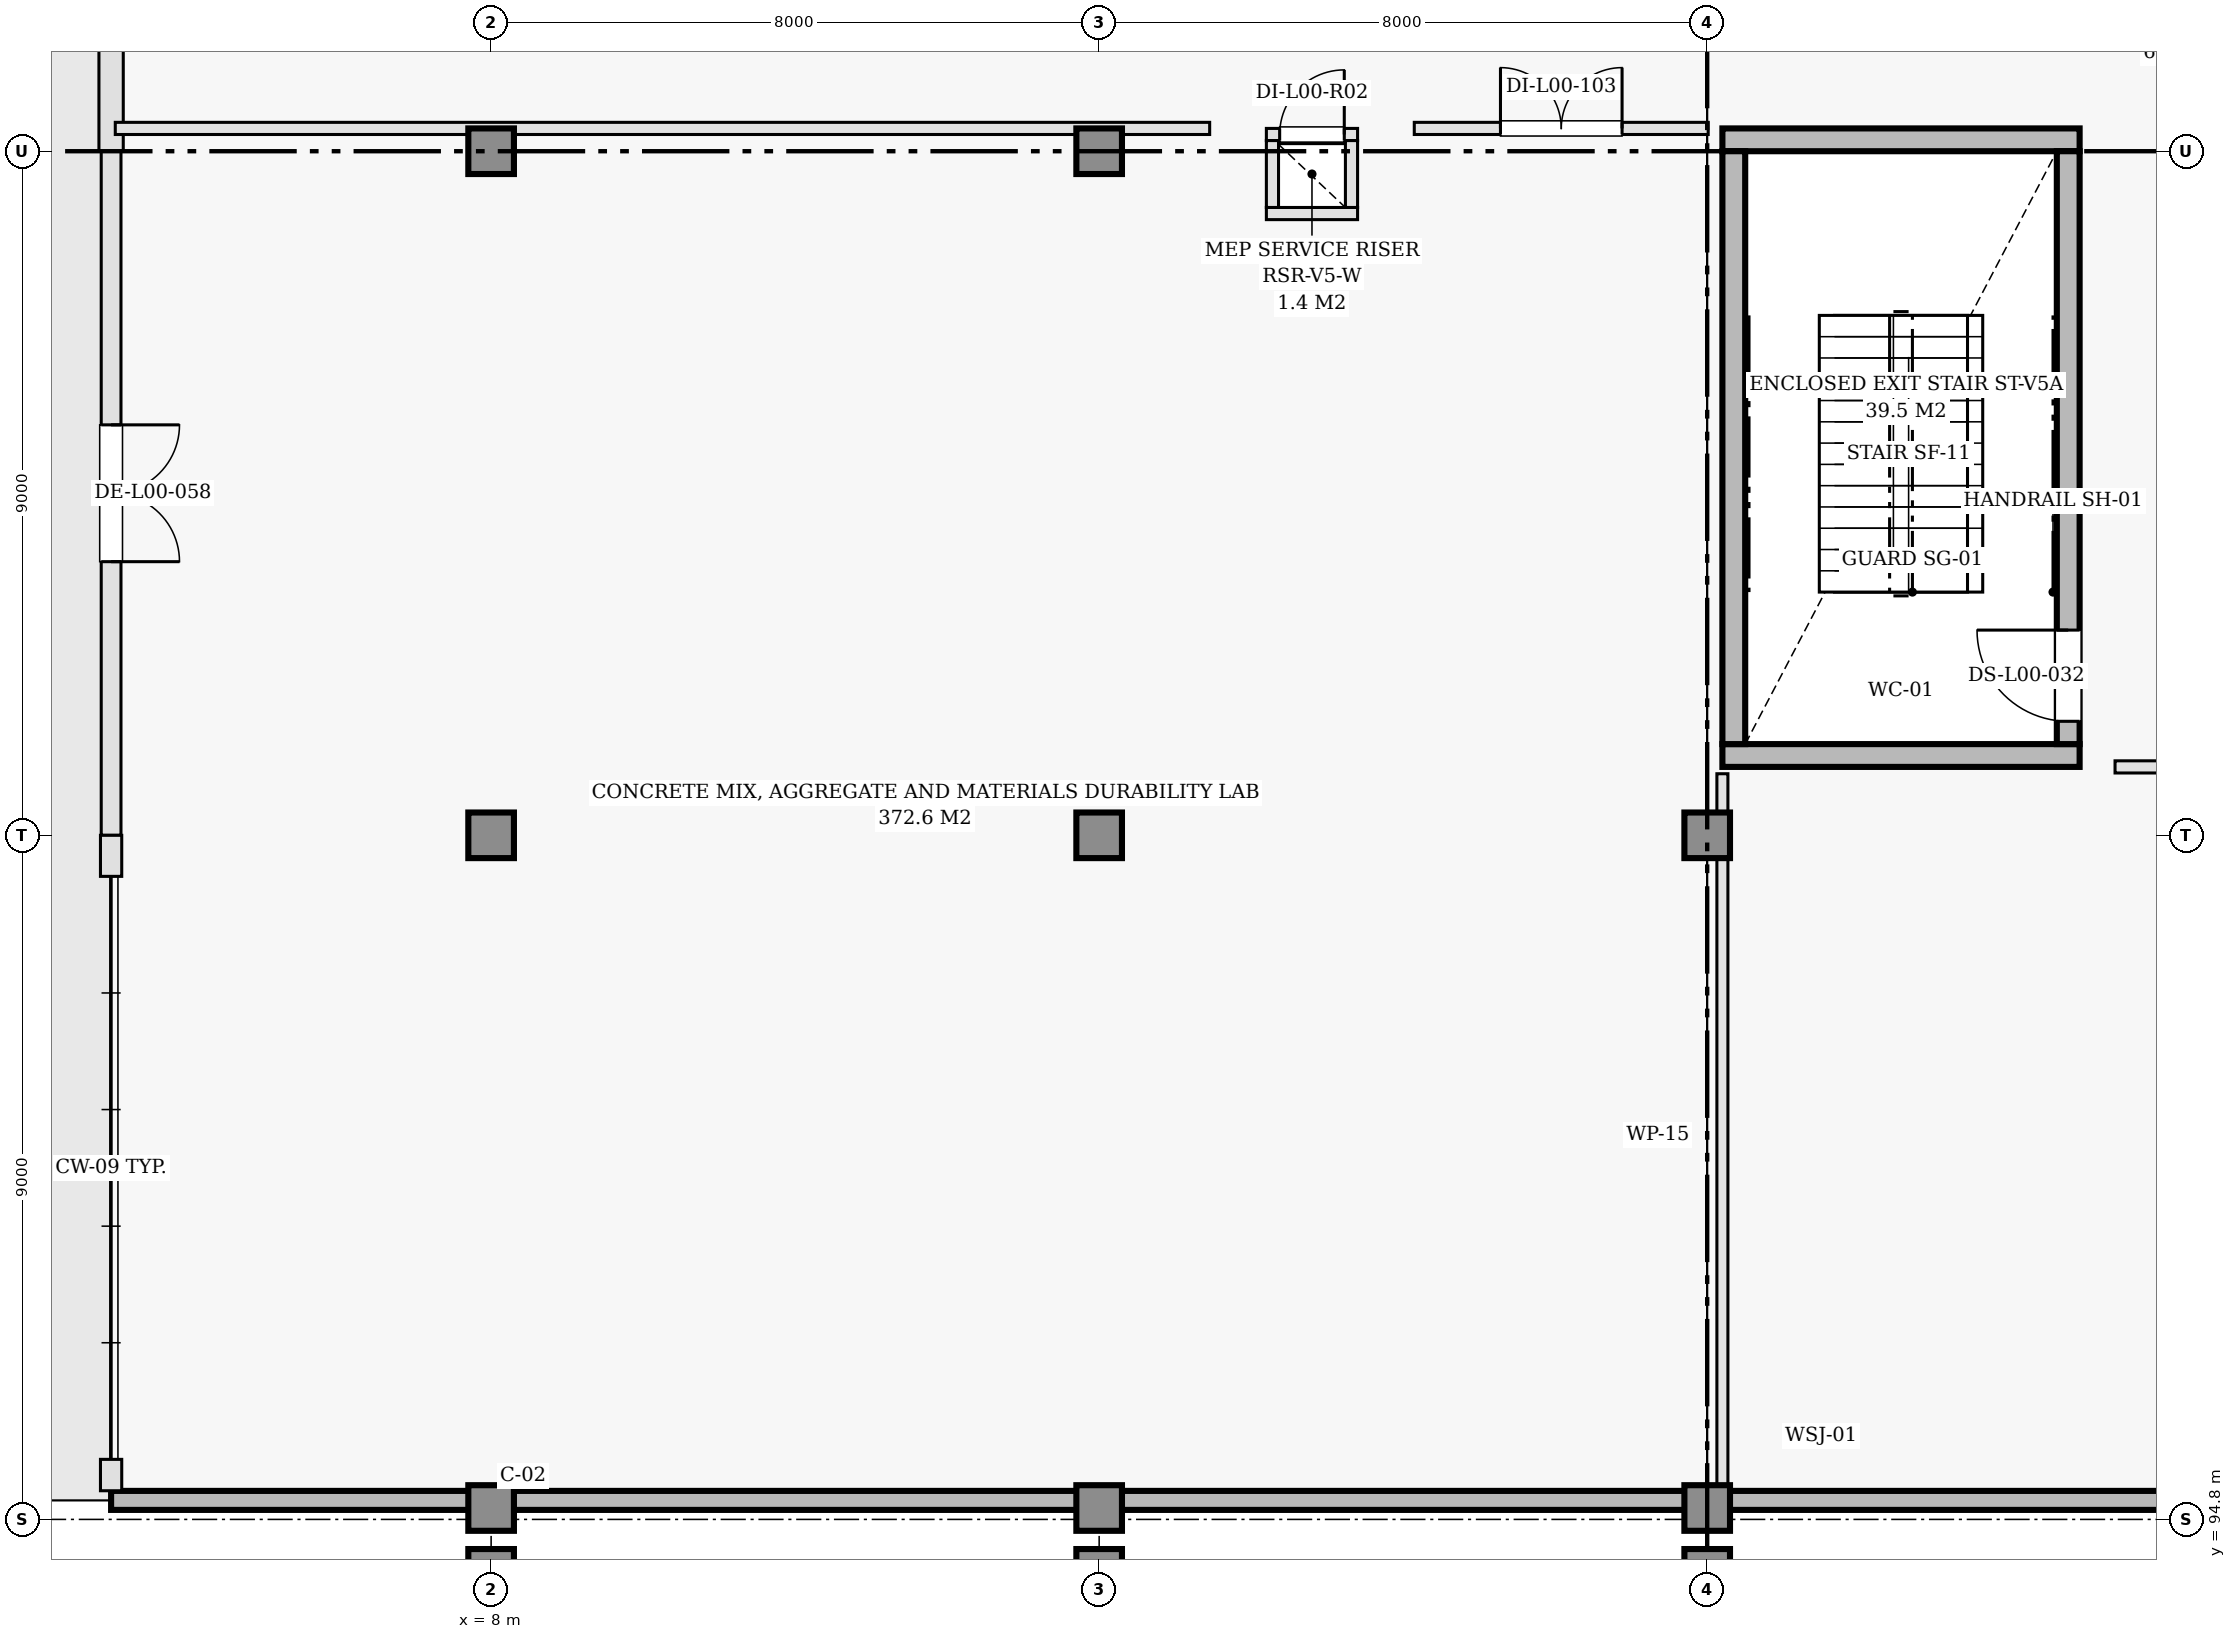
"""IFC4 building model, lengths in metres.
Left out: names, types, materials, properties, quantities, classifications, styles, units other than length and angle.
Written with IfcOpenShell. Run it as: python <this file> out.ifc"""

import sys

from ifc_helpers import new_model, si_unit, direction, frame, frame_2d, origin, origin_2d, place, context, subcontext, project, spatial, rectangle, extrude, element, fill, save


model = new_model("IFC4")
c1 = context("Model", 3, precision=1e-05, world=origin(), true_north=direction((0.0, 1.0)))
c2 = subcontext(c1, "Body", "Model", "MODEL_VIEW")
j1 = project(units=[si_unit("LENGTHUNIT", "METRE"), si_unit("PLANEANGLEUNIT", "RADIAN")], contexts=[c1])
p1 = place(None, origin())
s1 = spatial("IfcSite", under=j1, at=p1, CompositionType="ELEMENT")
p2 = place(p1, origin())
s2 = spatial("IfcBuilding", under=s1, at=p2, CompositionType="ELEMENT")
p3 = place(p2, origin())
s3 = spatial("IfcBuildingStorey", under=s2, at=p3, CompositionType="ELEMENT", Elevation=0.0)
for number, where, z_axis, x_axis in (
    (1, (8.0, 94.95, 0.0), (0.0, 0.0, 1.0), (1.0, 0.0, 0.0)),
    (2, (8.0, 103.8, 0.0), (0.0, 0.0, 1.0), (1.0, 0.0, 0.0)),
    (3, (8.0, 112.8, 0.0), (0.0, 0.0, 1.0), (1.0, 0.0, 0.0)),
    (4, (16.0, 94.95, 0.0), (0.0, 0.0, 1.0), (1.0, 0.0, 0.0)),
    (5, (16.0, 103.8, 0.0), (0.0, 0.0, 1.0), (1.0, 0.0, 0.0)),
    (6, (16.0, 112.8, 0.0), (0.0, 0.0, 1.0), (1.0, 0.0, 0.0)),
    (7, (24.0, 94.95, 0.0), (0.0, 0.0, 1.0), (1.0, 0.0, 0.0)),
    (8, (24.0, 103.8, 0.0), (0.0, 0.0, 1.0), (1.0, 0.0, 0.0)),
):
    element("IfcColumn", number, at=place(p3, frame(where, z_axis=z_axis, x_axis=x_axis)), inside=s3, PredefinedType="COLUMN", context=c2, shape_type="SweptSolid", body=[
        extrude(rectangle(XDim=0.6, YDim=0.6, at=origin_2d()), origin(), (0.0, 0.0, 1.0), 4.8),
    ])
for number, where, z_axis, x_axis in (
    (9, (8.0, 94.2, 0.0), (0.0, 0.0, 1.0), (1.0, 0.0, 0.0)),
    (10, (16.0, 94.2, 0.0), (0.0, 0.0, 1.0), (1.0, 0.0, 0.0)),
    (11, (24.0, 94.2, 0.0), (0.0, 0.0, 1.0), (1.0, 0.0, 0.0)),
):
    element("IfcColumn", number, at=place(p3, frame(where, z_axis=z_axis, x_axis=x_axis)), inside=s3, PredefinedType="COLUMN", context=c2, shape_type="SweptSolid", body=[
        extrude(rectangle(XDim=0.42, YDim=0.42, at=origin_2d()), origin(), (0.0, 0.0, 1.0), 4.8),
    ])
p4 = place(p3, frame((3.0, 95.05, 0.0), z_axis=(0.0, 0.0, 1.0), x_axis=(1.0, 0.0, 0.0)))
e12 = element("IfcWall", 12, at=p4, inside=s3, PredefinedType="SHEAR", context=c2, shape_type="SweptSolid", body=[
    extrude(rectangle(XDim=45.0, YDim=0.25, at=frame_2d((22.5, 0.0))), origin(), (0.0, 0.0, 1.0), 4.52),
])
p5 = place(p3, frame((3.0, 121.8, 0.0), z_axis=(0.0, 0.0, 1.0), x_axis=(0.0, -1.0, 0.0)))
e13 = element("IfcWall", 13, at=p5, inside=s3, PredefinedType="SOLIDWALL", context=c2, shape_type="SweptSolid", body=[
    extrude(rectangle(XDim=9.0, YDim=0.32, at=frame_2d((4.5, 0.0))), origin(), (0.0, 0.0, 1.0), 3.755),
])
p6 = place(p5, frame((2.1, 0.0, 0.95)))
e14 = element("IfcOpeningElement", 14, at=p6, cuts=e13, PredefinedType="OPENING", context=c2, shape_type="SweptSolid", body=[
    extrude(rectangle(XDim=1.8, YDim=1.75, at=frame_2d((0.9, 0.875))), frame((0.0, 0.17, 0.0), z_axis=(0.0, -1.0, 0.0), x_axis=(1.0, 0.0, 0.0)), (0.0, 0.0, 1.0), 0.34),
])
p7 = place(p3, frame((3.0, 112.8, 0.0), z_axis=(0.0, 0.0, 1.0), x_axis=(0.0, -1.0, 0.0)))
e15 = element("IfcWall", 15, at=p7, inside=s3, PredefinedType="SOLIDWALL", context=c2, shape_type="SweptSolid", body=[
    extrude(rectangle(XDim=9.0, YDim=0.26, at=frame_2d((4.5, 0.0))), origin(), (0.0, 0.0, 1.0), 3.755),
])
p8 = place(p7, frame((3.6, 0.0, 0.0)))
e16 = element("IfcOpeningElement", 16, at=p8, cuts=e15, PredefinedType="OPENING", context=c2, shape_type="SweptSolid", body=[
    extrude(rectangle(XDim=1.8, YDim=2.2, at=frame_2d((0.9, 1.1))), frame((0.0, 0.14, 0.0), z_axis=(0.0, -1.0, 0.0), x_axis=(1.0, 0.0, 0.0)), (0.0, 0.0, 1.0), 0.28),
])
p9 = place(p3, frame((3.0, 103.8, 0.0), z_axis=(0.0, 0.0, 1.0), x_axis=(0.0, -1.0, 0.0)))
e17 = element("IfcWall", 17, at=p9, inside=s3, PredefinedType="SOLIDWALL", context=c2, shape_type="SweptSolid", body=[
    extrude(rectangle(XDim=0.54, YDim=0.28, at=frame_2d((0.27, 0.0))), origin(), (0.0, 0.0, 1.0), 3.755),
])
p10 = place(p3, frame((3.0, 95.59, 0.0), z_axis=(0.0, 0.0, 1.0), x_axis=(0.0, -1.0, 0.0)))
e18 = element("IfcWall", 18, at=p10, inside=s3, PredefinedType="SOLIDWALL", context=c2, shape_type="SweptSolid", body=[
    extrude(rectangle(XDim=0.413, YDim=0.28, at=frame_2d((0.207, 0.0))), origin(), (0.0, 0.0, 1.0), 3.755),
])
for number, where, z_axis, x_axis in (
    (19, (24.2, 104.85, 0.0), (0.0, 0.0, 1.0), (1.0, 0.0, 0.0)),
    (20, (24.2, 112.95, 0.0), (0.0, 0.0, 1.0), (1.0, 0.0, 0.0)),
):
    element("IfcWall", number, at=place(p3, frame(where, z_axis=z_axis, x_axis=x_axis)), inside=s3, PredefinedType="SHEAR", context=c2, shape_type="SweptSolid", body=[
        extrude(rectangle(XDim=4.7, YDim=0.3, at=frame_2d((2.35, 0.0))), origin(), (0.0, 0.0, 1.0), 4.52),
    ])
p11 = place(p3, frame((24.35, 105.0, 0.0), z_axis=(0.0, 0.0, 1.0), x_axis=(0.0, 1.0, 0.0)))
e21 = element("IfcWall", 21, at=p11, inside=s3, PredefinedType="SHEAR", context=c2, shape_type="SweptSolid", body=[
    extrude(rectangle(XDim=7.8, YDim=0.3, at=frame_2d((3.9, 0.0))), origin(), (0.0, 0.0, 1.0), 4.52),
])
p12 = place(p3, frame((28.75, 105.0, 0.0), z_axis=(0.0, 0.0, 1.0), x_axis=(0.0, 1.0, 0.0)))
e22 = element("IfcWall", 22, at=p12, inside=s3, PredefinedType="SHEAR", context=c2, shape_type="SweptSolid", body=[
    extrude(rectangle(XDim=7.8, YDim=0.3, at=frame_2d((3.9, 0.0))), origin(), (0.0, 0.0, 1.0), 4.52),
])
p13 = place(p12, frame((0.3, 0.0, 0.0)))
e23 = element("IfcOpeningElement", 23, at=p13, cuts=e22, PredefinedType="OPENING", context=c2, shape_type="SweptSolid", body=[
    extrude(rectangle(XDim=1.2, YDim=2.15, at=frame_2d((0.6, 1.075))), frame((0.0, 0.16, 0.0), z_axis=(0.0, -1.0, 0.0), x_axis=(1.0, 0.0, 0.0)), (0.0, 0.0, 1.0), 0.32),
])
p14 = place(p3, frame((18.2, 111.98, 0.0), z_axis=(0.0, 0.0, 1.0), x_axis=(1.0, 0.0, 0.0)))
e24 = element("IfcWall", 24, at=p14, inside=s3, PredefinedType="PARTITIONING", context=c2, shape_type="SweptSolid", body=[
    extrude(rectangle(XDim=1.2, YDim=0.16, at=frame_2d((0.6, 0.0))), origin(), (0.0, 0.0, 1.0), 4.52),
])
p15 = place(p3, frame((18.2, 113.02, 0.0), z_axis=(0.0, 0.0, 1.0), x_axis=(1.0, 0.0, 0.0)))
e25 = element("IfcWall", 25, at=p15, inside=s3, PredefinedType="PARTITIONING", context=c2, shape_type="SweptSolid", body=[
    extrude(rectangle(XDim=1.2, YDim=0.16, at=frame_2d((0.6, 0.0))), origin(), (0.0, 0.0, 1.0), 4.52),
])
p16 = place(p15, frame((0.175, 0.0, 0.0)))
e26 = element("IfcOpeningElement", 26, at=p16, cuts=e25, PredefinedType="OPENING", context=c2, shape_type="SweptSolid", body=[
    extrude(rectangle(XDim=0.85, YDim=2.02, at=frame_2d((0.425, 1.01))), frame((0.0, 0.09, 0.0), z_axis=(0.0, -1.0, 0.0), x_axis=(1.0, 0.0, 0.0)), (0.0, 0.0, 1.0), 0.18),
])
for number, where, z_axis, x_axis in (
    (27, (18.28, 112.06, 0.0), (0.0, 0.0, 1.0), (0.0, 1.0, 0.0)),
    (28, (19.32, 112.06, 0.0), (0.0, 0.0, 1.0), (0.0, 1.0, 0.0)),
):
    element("IfcWall", number, at=place(p3, frame(where, z_axis=z_axis, x_axis=x_axis)), inside=s3, PredefinedType="PARTITIONING", context=c2, shape_type="SweptSolid", body=[
        extrude(rectangle(XDim=0.88, YDim=0.16, at=frame_2d((0.44, 0.0))), origin(), (0.0, 0.0, 1.0), 4.52),
    ])
p17 = place(p3, frame((20.146, 113.1, 0.0), z_axis=(0.0, 0.0, 1.0), x_axis=(1.0, 0.0, 0.0)))
e29 = element("IfcWall", 29, at=p17, inside=s3, PredefinedType="PARTITIONING", context=c2, shape_type="SweptSolid", body=[
    extrude(rectangle(XDim=3.867, YDim=0.16, at=frame_2d((1.934, 0.0))), origin(), (0.0, 0.0, 1.0), 4.52),
])
p18 = place(p17, frame((1.134, 0.0, 0.0)))
e30 = element("IfcOpeningElement", 30, at=p18, cuts=e29, PredefinedType="OPENING", context=c2, shape_type="SweptSolid", body=[
    extrude(rectangle(XDim=1.6, YDim=2.2, at=frame_2d((0.8, 1.1))), frame((0.0, 0.09, 0.0), z_axis=(0.0, -1.0, 0.0), x_axis=(1.0, 0.0, 0.0)), (0.0, 0.0, 1.0), 0.18),
])
p19 = place(p3, frame((3.055, 113.1, 0.0), z_axis=(0.0, 0.0, 1.0), x_axis=(1.0, 0.0, 0.0)))
e31 = element("IfcWall", 31, at=p19, inside=s3, PredefinedType="PARTITIONING", context=c2, shape_type="SweptSolid", body=[
    extrude(rectangle(XDim=14.399, YDim=0.16, at=frame_2d((7.2, 0.0))), origin(), (0.0, 0.0, 1.0), 3.755),
])
p20 = place(p3, frame((24.2, 95.105, 0.0), z_axis=(0.0, 0.0, 1.0), x_axis=(0.0, 1.0, 0.0)))
e32 = element("IfcWall", 32, at=p20, inside=s3, PredefinedType="PARTITIONING", context=c2, shape_type="SweptSolid", body=[
    extrude(rectangle(XDim=9.505, YDim=0.145, at=frame_2d((4.752, 0.0))), origin(), (0.0, 0.0, 1.0), 3.755),
])
p21 = place(p3, frame((29.366, 104.7, 0.0), z_axis=(0.0, 0.0, 1.0), x_axis=(1.0, 0.0, 0.0)))
e33 = element("IfcWall", 33, at=p21, inside=s3, PredefinedType="PARTITIONING", context=c2, shape_type="SweptSolid", body=[
    extrude(rectangle(XDim=2.214, YDim=0.16, at=frame_2d((1.107, 0.0))), origin(), (0.0, 0.0, 1.0), 4.52),
])
p22 = place(p8, origin())
e34 = element("IfcDoor", 34, at=p22, inside=s3, OperationType="DOUBLE_DOOR_SINGLE_SWING", PredefinedType="DOOR", context=c2, shape_type="SweptSolid", body=[
    extrude(rectangle(XDim=1.8, YDim=2.2, at=frame_2d((0.9, 1.1))), frame((0.0, 0.025, 0.0), z_axis=(0.0, -1.0, 0.0), x_axis=(1.0, 0.0, 0.0)), (0.0, 0.0, 1.0), 0.05),
])
fill(e16, e34)
p23 = place(p13, origin())
e35 = element("IfcDoor", 35, at=p23, inside=s3, OperationType="SINGLE_SWING_RIGHT", PredefinedType="DOOR", context=c2, shape_type="SweptSolid", body=[
    extrude(rectangle(XDim=1.2, YDim=2.15, at=frame_2d((0.6, 1.075))), frame((0.0, 0.025, 0.0), z_axis=(0.0, -1.0, 0.0), x_axis=(1.0, 0.0, 0.0)), (0.0, 0.0, 1.0), 0.05),
])
fill(e23, e35)
p24 = place(p16, origin())
e36 = element("IfcDoor", 36, at=p24, inside=s3, OperationType="SINGLE_SWING_RIGHT", PredefinedType="DOOR", context=c2, shape_type="SweptSolid", body=[
    extrude(rectangle(XDim=0.85, YDim=2.02, at=frame_2d((0.425, 1.01))), frame((0.0, 0.025, 0.0), z_axis=(0.0, -1.0, 0.0), x_axis=(1.0, 0.0, 0.0)), (0.0, 0.0, 1.0), 0.05),
])
fill(e26, e36)
p25 = place(p18, origin())
e37 = element("IfcDoor", 37, at=p25, inside=s3, OperationType="DOUBLE_DOOR_SINGLE_SWING", PredefinedType="DOOR", context=c2, shape_type="SweptSolid", body=[
    extrude(rectangle(XDim=1.6, YDim=2.2, at=frame_2d((0.8, 1.1))), frame((0.0, 0.025, 0.0), z_axis=(0.0, -1.0, 0.0), x_axis=(1.0, 0.0, 0.0)), (0.0, 0.0, 1.0), 0.05),
])
fill(e30, e37)
save(model, sys.argv[1])
